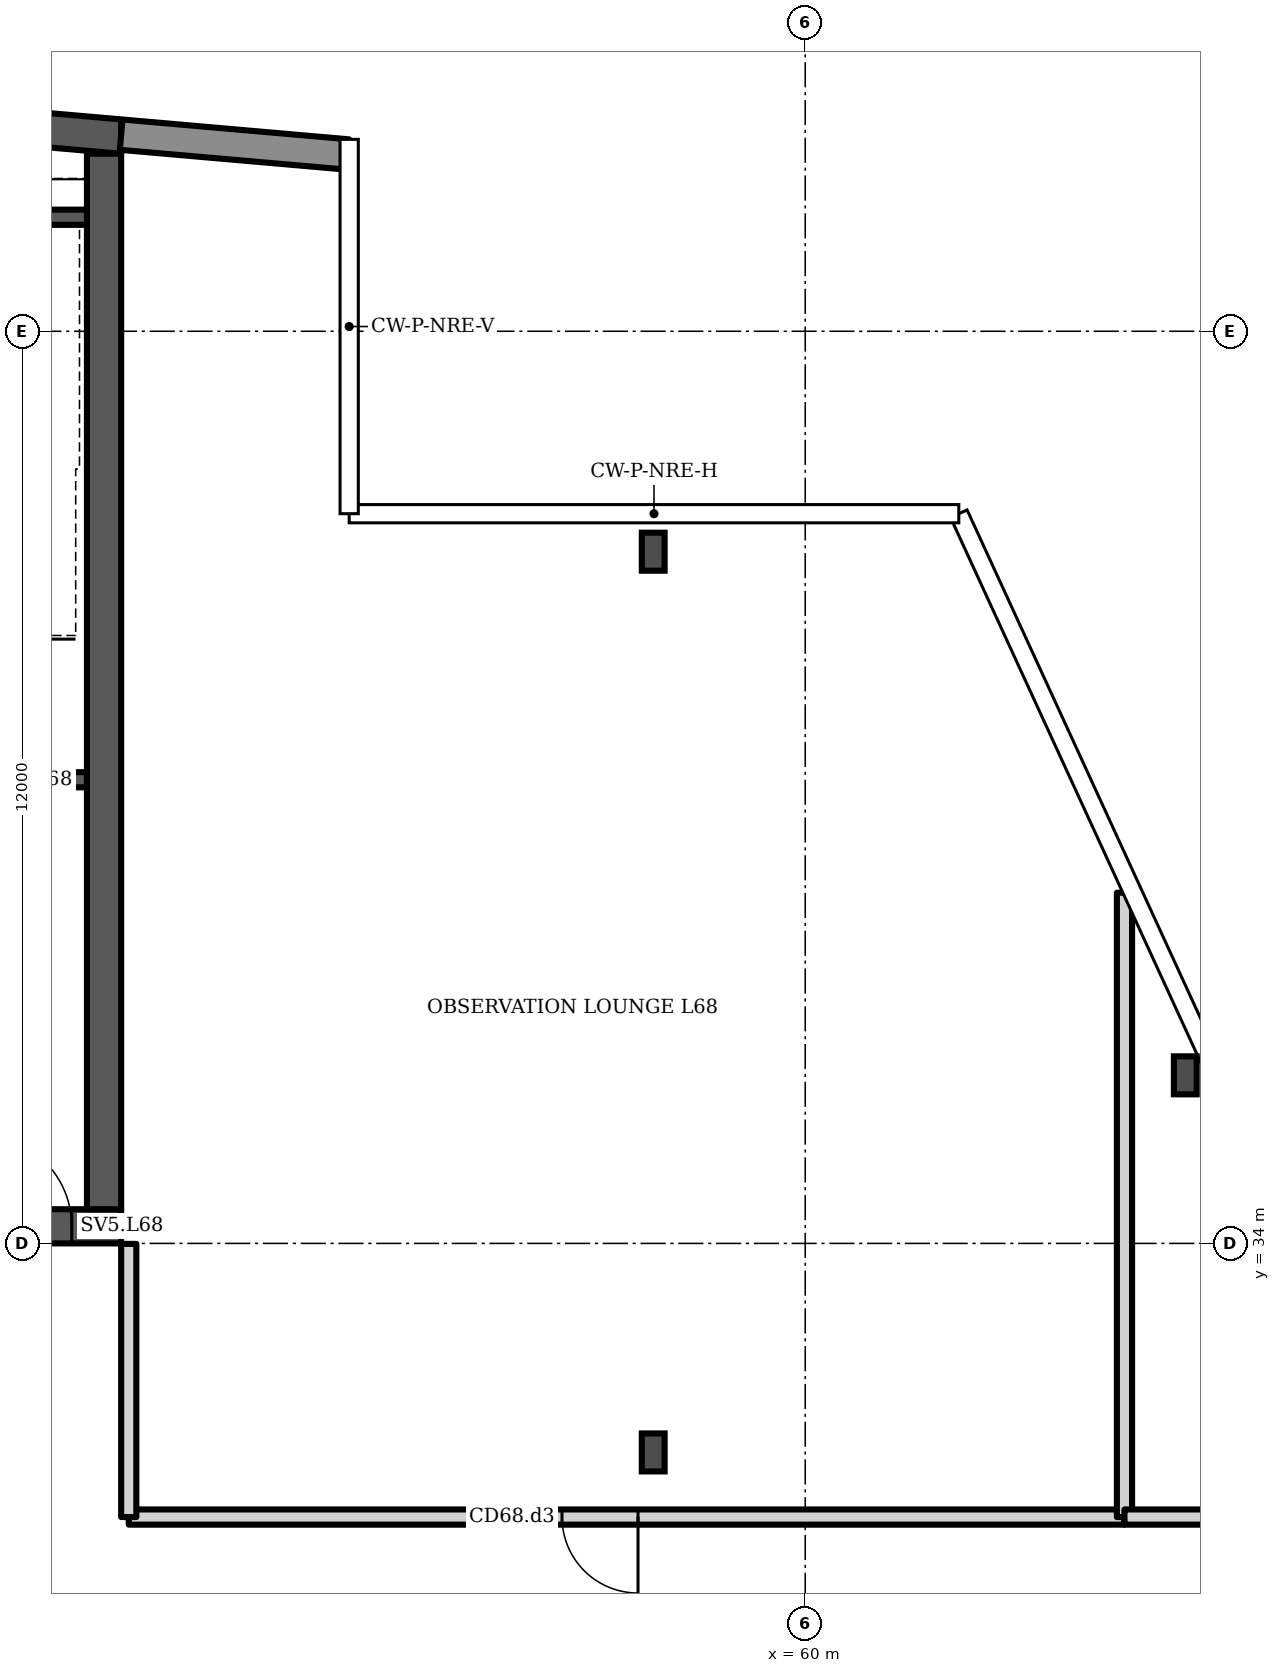
"""IFC4 building model, lengths in metres.
Left out: names, types, materials, properties, quantities, classifications, styles, units other than length and angle.
Written with IfcOpenShell. Run it as: python <this file> out.ifc"""

import sys

from ifc_helpers import new_model, si_unit, direction, frame, frame_2d, origin, origin_2d, place, context, subcontext, project, spatial, polyline, rectangle, i_section, outline, extrude, element, fill, save


model = new_model("IFC4")
c1 = context("Model", 3, precision=1e-05, world=origin(), true_north=direction((0.0, 1.0)))
c2 = subcontext(c1, "Body", "Model", "MODEL_VIEW")
j1 = project(units=[si_unit("LENGTHUNIT", "METRE"), si_unit("PLANEANGLEUNIT", "RADIAN")], contexts=[c1])
p1 = place(None, origin())
s1 = spatial("IfcSite", under=j1, at=p1, CompositionType="ELEMENT")
p2 = place(p1, origin())
s2 = spatial("IfcBuilding", under=s1, at=p2, CompositionType="ELEMENT")
p3 = place(p2, frame((0.0, 0.0, 267.5)))
s3 = spatial("IfcBuildingStorey", under=s2, at=p3, CompositionType="ELEMENT", Elevation=267.5)
p4 = place(p3, frame((0.0, 0.0, -0.0)))
e1 = element("IfcWall", 1, at=p4, inside=s3, PredefinedType="SHEAR", context=c2, shape_type="SweptSolid", body=[
    extrude(outline(polyline([(37.0, 49.561), (51.0, 48.336), (51.0, 48.787), (37.0, 50.012), (37.0, 49.561)])), origin(), (0.0, 0.0, 1.0), 1.622),
])
p5 = place(p3, frame((37.0, 34.225, 0.0), z_axis=(0.0, 0.0, 1.0), x_axis=(1.0, 0.0, 0.0)))
e2 = element("IfcWall", 2, at=p5, inside=s3, PredefinedType="SHEAR", context=c2, shape_type="SweptSolid", body=[
    extrude(outline(polyline([(0.0, 0.0), (14.0, 0.0), (14.0, 3.2), (12.25, 3.2), (10.5, 3.2), (8.75, 3.2), (7.0, 3.2), (5.25, 3.2), (3.5, 3.036), (1.75, 2.329), (0.0, 2.25), (0.0, 0.0)])), frame((0.0, 0.225, 0.0), z_axis=(0.0, -1.0, 0.0), x_axis=(1.0, 0.0, 0.0)), (0.0, 0.0, 1.0), 0.45),
])
p6 = place(p5, frame((0.792, 0.0, 0.0)))
e3 = element("IfcOpeningElement", 3, at=p6, cuts=e2, PredefinedType="OPENING", context=c2, shape_type="SweptSolid", body=[
    extrude(rectangle(XDim=1.1, YDim=2.1, at=frame_2d((0.55, 1.05))), frame((0.0, 0.235, 0.0), z_axis=(0.0, -1.0, 0.0), x_axis=(1.0, 0.0, 0.0)), (0.0, 0.0, 1.0), 0.47),
])
p7 = place(p5, frame((5.221, 0.0, 0.0)))
e4 = element("IfcOpeningElement", 4, at=p7, cuts=e2, PredefinedType="OPENING", context=c2, shape_type="SweptSolid", body=[
    extrude(rectangle(XDim=1.1, YDim=2.1, at=frame_2d((0.55, 1.05))), frame((0.0, 0.235, 0.0), z_axis=(0.0, -1.0, 0.0), x_axis=(1.0, 0.0, 0.0)), (0.0, 0.0, 1.0), 0.47),
])
p8 = place(p5, frame((12.15, 0.0, 0.0)))
e5 = element("IfcOpeningElement", 5, at=p8, cuts=e2, PredefinedType="OPENING", context=c2, shape_type="SweptSolid", body=[
    extrude(rectangle(XDim=1.2, YDim=2.1, at=frame_2d((0.6, 1.05))), frame((0.0, 0.235, 0.0), z_axis=(0.0, -1.0, 0.0), x_axis=(1.0, 0.0, 0.0)), (0.0, 0.0, 1.0), 0.47),
])
p9 = place(p3, frame((50.775, 34.45, 0.0), z_axis=(0.0, 0.0, 1.0), x_axis=(0.0, 1.0, 0.0)))
e6 = element("IfcWall", 6, at=p9, inside=s3, PredefinedType="SHEAR", context=c2, shape_type="SweptSolid", body=[
    extrude(rectangle(XDim=13.886, YDim=0.45, at=frame_2d((6.943, 0.0))), origin(), (0.0, 0.0, 1.0), 3.2),
])
for number, where, z_axis, x_axis in (
    (7, (58.0, 31.25, 0.0), (0.0, 0.0, 1.0), (1.0, 0.0, 0.0)),
    (8, (58.0, 43.1, 0.0), (0.0, 0.0, 1.0), (1.0, 0.0, 0.0)),
    (9, (65.0, 36.211, 0.0), (0.0, 0.0, 1.0), (1.0, 0.0, 0.0)),
):
    element("IfcColumn", number, at=place(p3, frame(where, z_axis=z_axis, x_axis=x_axis)), inside=s3, PredefinedType="COLUMN", context=c2, shape_type="SweptSolid", body=[
        extrude(i_section(OverallWidth=0.3, OverallDepth=0.5, WebThickness=0.014, FlangeThickness=0.028, FilletRadius=0.027, at=origin_2d()), origin(), (0.0, 0.0, 1.0), 3.2),
    ])
p10 = place(p3, frame((53.983, 48.326, 0.0), z_axis=(0.0, 0.0, 1.0), x_axis=(-0.996194, 0.087168, 0.0)))
e10 = element("IfcWall", 10, at=p10, inside=s3, PredefinedType="SOLIDWALL", context=c2, shape_type="SweptSolid", body=[
    extrude(rectangle(XDim=2.994, YDim=0.4, at=frame_2d((1.497, 0.0))), origin(), (0.0, 0.0, 1.0), 2.8),
])
p11 = place(p3, frame((44.225, 40.1, 0.0), z_axis=(0.0, 0.0, 1.0), x_axis=(1.0, 0.0, 0.0)))
e11 = element("IfcWall", 11, at=p11, inside=s3, PredefinedType="SHEAR", context=c2, shape_type="SweptSolid", body=[
    extrude(rectangle(XDim=6.325, YDim=0.2, at=frame_2d((3.163, 0.0))), origin(), (0.0, 0.0, 1.0), 2.8),
])
p12 = place(p11, frame((3.7, 0.0, 0.0)))
e12 = element("IfcOpeningElement", 12, at=p12, cuts=e11, PredefinedType="OPENING", context=c2, shape_type="SweptSolid", body=[
    extrude(rectangle(XDim=1.2, YDim=2.1, at=frame_2d((0.6, 1.05))), frame((0.0, 0.11, 0.0), z_axis=(0.0, -1.0, 0.0), x_axis=(1.0, 0.0, 0.0)), (0.0, 0.0, 1.0), 0.22),
])
p13 = place(p11, frame((0.663, 0.0, 0.0)))
e13 = element("IfcOpeningElement", 13, at=p13, cuts=e11, PredefinedType="OPENING", context=c2, shape_type="SweptSolid", body=[
    extrude(rectangle(XDim=0.9, YDim=2.1, at=frame_2d((0.45, 1.05))), frame((0.0, 0.11, 0.0), z_axis=(0.0, -1.0, 0.0), x_axis=(1.0, 0.0, 0.0)), (0.0, 0.0, 1.0), 0.22),
])
p14 = place(p3, frame((46.75, 47.5, 0.0), z_axis=(0.0, 0.0, 1.0), x_axis=(1.0, 0.0, 0.0)))
e14 = element("IfcWall", 14, at=p14, inside=s3, PredefinedType="SHEAR", context=c2, shape_type="SweptSolid", body=[
    extrude(rectangle(XDim=3.8, YDim=0.2, at=frame_2d((1.9, 0.0))), origin(), (0.0, 0.0, 1.0), 2.8),
])
p15 = place(p3, frame((64.2, 30.4, 0.0), z_axis=(0.0, 0.0, 1.0), x_axis=(-1.0, 0.0, 0.0)))
e15 = element("IfcWall", 15, at=p15, inside=s3, PredefinedType="PARTITIONING", context=c2, shape_type="SweptSolid", body=[
    extrude(rectangle(XDim=13.1, YDim=0.2, at=frame_2d((6.55, 0.0))), origin(), (0.0, 0.0, 1.0), 2.8),
])
p16 = place(p15, frame((6.4, 0.0, 0.0)))
e16 = element("IfcOpeningElement", 16, at=p16, cuts=e15, PredefinedType="OPENING", context=c2, shape_type="SweptSolid", body=[
    extrude(rectangle(XDim=1.0, YDim=2.1, at=frame_2d((0.5, 1.05))), frame((0.0, 0.11, 0.0), z_axis=(0.0, -1.0, 0.0), x_axis=(1.0, 0.0, 0.0)), (0.0, 0.0, 1.0), 0.22),
])
p17 = place(p3, frame((64.2, 38.614, 0.0), z_axis=(0.0, 0.0, 1.0), x_axis=(0.0, -1.0, 0.0)))
e17 = element("IfcWall", 17, at=p17, inside=s3, PredefinedType="PARTITIONING", context=c2, shape_type="SweptSolid", body=[
    extrude(rectangle(XDim=8.214, YDim=0.2, at=frame_2d((4.107, 0.0))), origin(), (0.0, 0.0, 1.0), 2.8),
])
p18 = place(p3, frame((51.1, 30.4, 0.0), z_axis=(0.0, 0.0, 1.0), x_axis=(0.0, 1.0, 0.0)))
e18 = element("IfcWall", 18, at=p18, inside=s3, PredefinedType="PARTITIONING", context=c2, shape_type="SweptSolid", body=[
    extrude(rectangle(XDim=3.594, YDim=0.2, at=frame_2d((1.797, 0.0))), origin(), (0.0, 0.0, 1.0), 2.8),
])
p19 = place(p3, frame((66.0, 30.4, 0.0), z_axis=(0.0, 0.0, 1.0), x_axis=(-1.0, 0.0, 0.0)))
e19 = element("IfcWall", 19, at=p19, inside=s3, PredefinedType="PARTITIONING", context=c2, shape_type="SweptSolid", body=[
    extrude(rectangle(XDim=1.8, YDim=0.2, at=frame_2d((0.9, 0.0))), origin(), (0.0, 0.0, 1.0), 2.8),
])
p20 = place(p8, origin())
e20 = element("IfcDoor", 20, at=p20, inside=s3, OperationType="SINGLE_SWING_LEFT", PredefinedType="DOOR", context=c2, shape_type="SweptSolid", body=[
    extrude(rectangle(XDim=1.2, YDim=2.1, at=frame_2d((0.6, 1.05))), frame((0.0, 0.025, 0.0), z_axis=(0.0, -1.0, 0.0), x_axis=(1.0, 0.0, 0.0)), (0.0, 0.0, 1.0), 0.05),
])
fill(e5, e20)
p21 = place(p16, origin())
e21 = element("IfcDoor", 21, at=p21, inside=s3, OperationType="SINGLE_SWING_LEFT", PredefinedType="DOOR", context=c2, shape_type="SweptSolid", body=[
    extrude(rectangle(XDim=1.0, YDim=2.1, at=frame_2d((0.5, 1.05))), frame((0.0, 0.025, 0.0), z_axis=(0.0, -1.0, 0.0), x_axis=(1.0, 0.0, 0.0)), (0.0, 0.0, 1.0), 0.05),
])
fill(e16, e21)
save(model, sys.argv[1])
